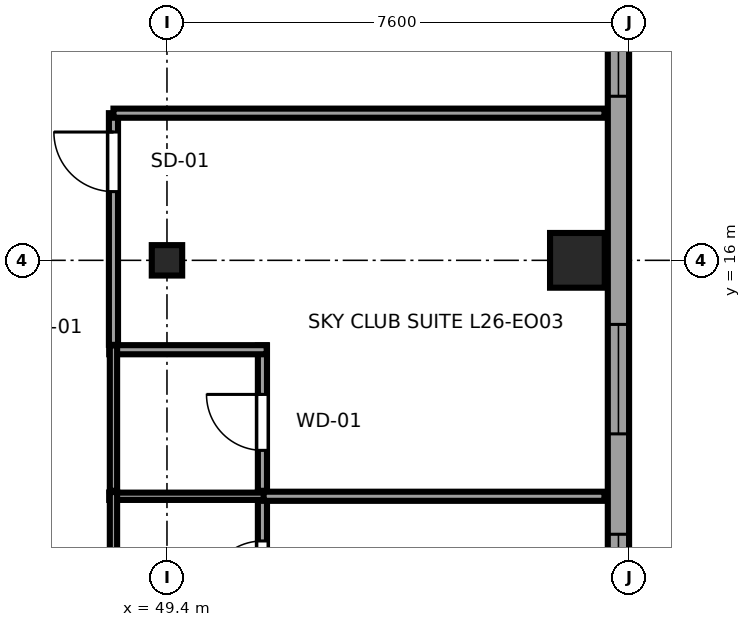
"""IFC4 building model, lengths in metres.
Left out: names, types, materials, properties, quantities, classifications, styles, units other than length and angle.
Written with IfcOpenShell. Run it as: python <this file> out.ifc"""

import sys

from ifc_helpers import new_model, si_unit, direction, frame, frame_2d, origin, origin_2d, place, context, subcontext, project, spatial, rectangle, i_section, extrude, source, transform, mapped, element, fill, save


model = new_model("IFC4")
c1 = context("Model", 3, precision=1e-05, world=origin(), true_north=direction((0.0, 1.0)))
c2 = subcontext(c1, "Body", "Model", "MODEL_VIEW")
j1 = project(units=[si_unit("LENGTHUNIT", "METRE"), si_unit("PLANEANGLEUNIT", "RADIAN")], contexts=[c1])
p1 = place(None, origin())
s1 = spatial("IfcSite", under=j1, at=p1, CompositionType="ELEMENT")
p2 = place(p1, origin())
s2 = spatial("IfcBuilding", under=s1, at=p2, CompositionType="ELEMENT")
p3 = place(p2, frame((0.0, 0.0, 104.45)))
s3 = spatial("IfcBuildingStorey", under=s2, at=p3, CompositionType="ELEMENT", Elevation=104.45)
m1 = source(origin(), c2, "Body", "SweptSolid", [
    extrude(i_section(OverallWidth=0.5, OverallDepth=0.5, WebThickness=0.022, FlangeThickness=0.034, at=origin_2d()), origin(), (0.0, 0.0, 1.0), 3.55),
])
p4 = place(p3, frame((49.4, 16.0, 0.0), z_axis=(0.0, 0.0, 1.0), x_axis=(1.0, 0.0, 0.0)))
e1 = element("IfcColumn", 1, at=p4, inside=s3, PredefinedType="COLUMN", context=c2, shape_type="MappedRepresentation", body=[
    mapped(m1, transform((0.0, 0.0, 0.0), x_axis=(1.0, 0.0, 0.0), y_axis=(0.0, 1.0, 0.0), z_axis=(0.0, 0.0, 1.0), scale=1.0)),
])
m2 = source(origin(), c2, "Body", "SweptSolid", [
    extrude(rectangle(XDim=0.9, YDim=0.9, at=origin_2d()), origin(), (0.0, 0.0, 1.0), 3.55),
])
p5 = place(p3, frame((56.15, 16.0, 0.0), z_axis=(0.0, 0.0, 1.0), x_axis=(1.0, 0.0, 0.0)))
e2 = element("IfcColumn", 2, at=p5, inside=s3, PredefinedType="COLUMN", context=c2, shape_type="MappedRepresentation", body=[
    mapped(m2, transform((0.0, 0.0, 0.0), x_axis=(1.0, 0.0, 0.0), y_axis=(0.0, 1.0, 0.0), z_axis=(0.0, 0.0, 1.0), scale=1.0)),
])
p6 = place(p3, frame((56.825, 4.617, 0.0), z_axis=(0.0, 0.0, 1.0), x_axis=(0.0, 1.0, 0.0)))
e3 = element("IfcWall", 3, at=p6, inside=s3, PredefinedType="SOLIDWALL", context=c2, shape_type="SweptSolid", body=[
    extrude(rectangle(XDim=36.766, YDim=0.35, at=frame_2d((18.383, 0.0))), origin(), (0.0, 0.0, 1.0), 3.37),
])
p7 = place(p6, frame((5.078, 0.0, 0.68)))
e4 = element("IfcOpeningElement", 4, at=p7, cuts=e3, PredefinedType="OPENING", context=c2, shape_type="SweptSolid", body=[
    extrude(rectangle(XDim=1.8, YDim=1.85, at=frame_2d((0.9, 0.925))), frame((0.0, 0.185, 0.0), z_axis=(0.0, -1.0, 0.0), x_axis=(1.0, 0.0, 0.0)), (0.0, 0.0, 1.0), 0.37),
])
p8 = place(p6, frame((8.529, 0.0, 0.68)))
e5 = element("IfcOpeningElement", 5, at=p8, cuts=e3, PredefinedType="OPENING", context=c2, shape_type="SweptSolid", body=[
    extrude(rectangle(XDim=1.8, YDim=1.85, at=frame_2d((0.9, 0.925))), frame((0.0, 0.185, 0.0), z_axis=(0.0, -1.0, 0.0), x_axis=(1.0, 0.0, 0.0)), (0.0, 0.0, 1.0), 0.37),
])
p9 = place(p6, frame((14.081, 0.0, 0.68)))
e6 = element("IfcOpeningElement", 6, at=p9, cuts=e3, PredefinedType="OPENING", context=c2, shape_type="SweptSolid", body=[
    extrude(rectangle(XDim=1.8, YDim=1.85, at=frame_2d((0.9, 0.925))), frame((0.0, 0.185, 0.0), z_axis=(0.0, -1.0, 0.0), x_axis=(1.0, 0.0, 0.0)), (0.0, 0.0, 1.0), 0.37),
])
p10 = place(p6, frame((16.933, 0.0, 0.68)))
e7 = element("IfcOpeningElement", 7, at=p10, cuts=e3, PredefinedType="OPENING", context=c2, shape_type="SweptSolid", body=[
    extrude(rectangle(XDim=1.8, YDim=1.85, at=frame_2d((0.9, 0.925))), frame((0.0, 0.185, 0.0), z_axis=(0.0, -1.0, 0.0), x_axis=(1.0, 0.0, 0.0)), (0.0, 0.0, 1.0), 0.37),
])
p11 = place(p6, frame((21.435, 0.0, 0.68)))
e8 = element("IfcOpeningElement", 8, at=p11, cuts=e3, PredefinedType="OPENING", context=c2, shape_type="SweptSolid", body=[
    extrude(rectangle(XDim=1.8, YDim=1.85, at=frame_2d((0.9, 0.925))), frame((0.0, 0.185, 0.0), z_axis=(0.0, -1.0, 0.0), x_axis=(1.0, 0.0, 0.0)), (0.0, 0.0, 1.0), 0.37),
])
p12 = place(p6, frame((25.386, 0.0, 0.68)))
e9 = element("IfcOpeningElement", 9, at=p12, cuts=e3, PredefinedType="OPENING", context=c2, shape_type="SweptSolid", body=[
    extrude(rectangle(XDim=1.8, YDim=1.85, at=frame_2d((0.9, 0.925))), frame((0.0, 0.185, 0.0), z_axis=(0.0, -1.0, 0.0), x_axis=(1.0, 0.0, 0.0)), (0.0, 0.0, 1.0), 0.37),
])
p13 = place(p6, frame((33.29, 0.0, 0.68)))
e10 = element("IfcOpeningElement", 10, at=p13, cuts=e3, PredefinedType="OPENING", context=c2, shape_type="SweptSolid", body=[
    extrude(rectangle(XDim=1.8, YDim=1.85, at=frame_2d((0.9, 0.925))), frame((0.0, 0.185, 0.0), z_axis=(0.0, -1.0, 0.0), x_axis=(1.0, 0.0, 0.0)), (0.0, 0.0, 1.0), 0.37),
])
p14 = place(p3, frame((50.97, 9.8, 0.0), z_axis=(0.0, 0.0, 1.0), x_axis=(0.0, 1.0, 0.0)))
e11 = element("IfcWall", 11, at=p14, inside=s3, PredefinedType="PARTITIONING", context=c2, shape_type="SweptSolid", body=[
    extrude(rectangle(XDim=2.39, YDim=0.15, at=frame_2d((1.195, 0.0))), origin(), (0.0, 0.0, 1.0), 3.37),
])
p15 = place(p14, frame((0.665, 0.0, 0.0)))
e12 = element("IfcOpeningElement", 12, at=p15, cuts=e11, PredefinedType="OPENING", context=c2, shape_type="SweptSolid", body=[
    extrude(rectangle(XDim=0.92, YDim=2.01, at=frame_2d((0.46, 1.005))), frame((0.0, 0.085, 0.0), z_axis=(0.0, -1.0, 0.0), x_axis=(1.0, 0.0, 0.0)), (0.0, 0.0, 1.0), 0.17),
])
p16 = place(p3, frame((48.45, 12.12, 0.0), z_axis=(0.0, 0.0, 1.0), x_axis=(1.0, 0.0, 0.0)))
e13 = element("IfcWall", 13, at=p16, inside=s3, PredefinedType="PLUMBINGWALL", context=c2, shape_type="SweptSolid", body=[
    extrude(rectangle(XDim=2.59, YDim=0.12, at=frame_2d((1.295, 0.0))), origin(), (0.0, 0.0, 1.0), 3.37),
])
p17 = place(p3, frame((48.52, 9.8, 0.0), z_axis=(0.0, 0.0, 1.0), x_axis=(0.0, 1.0, 0.0)))
e14 = element("IfcWall", 14, at=p17, inside=s3, PredefinedType="PLUMBINGWALL", context=c2, shape_type="SweptSolid", body=[
    extrude(rectangle(XDim=2.39, YDim=0.12, at=frame_2d((1.195, 0.0))), origin(), (0.0, 0.0, 1.0), 3.37),
])
p18 = place(p3, frame((50.97, 12.21, 0.0), z_axis=(0.0, 0.0, 1.0), x_axis=(0.0, 1.0, 0.0)))
e15 = element("IfcWall", 15, at=p18, inside=s3, PredefinedType="PARTITIONING", context=c2, shape_type="SweptSolid", body=[
    extrude(rectangle(XDim=2.39, YDim=0.15, at=frame_2d((1.195, 0.0))), origin(), (0.0, 0.0, 1.0), 3.37),
])
p19 = place(p18, frame((0.665, 0.0, 0.0)))
e16 = element("IfcOpeningElement", 16, at=p19, cuts=e15, PredefinedType="OPENING", context=c2, shape_type="SweptSolid", body=[
    extrude(rectangle(XDim=0.92, YDim=2.01, at=frame_2d((0.46, 1.005))), frame((0.0, 0.085, 0.0), z_axis=(0.0, -1.0, 0.0), x_axis=(1.0, 0.0, 0.0)), (0.0, 0.0, 1.0), 0.17),
])
p20 = place(p3, frame((48.45, 14.53, 0.0), z_axis=(0.0, 0.0, 1.0), x_axis=(1.0, 0.0, 0.0)))
e17 = element("IfcWall", 17, at=p20, inside=s3, PredefinedType="PARTITIONING", context=c2, shape_type="SweptSolid", body=[
    extrude(rectangle(XDim=2.59, YDim=0.15, at=frame_2d((1.295, 0.0))), origin(), (0.0, 0.0, 1.0), 3.37),
])
p21 = place(p3, frame((48.52, 12.21, 0.0), z_axis=(0.0, 0.0, 1.0), x_axis=(0.0, 1.0, 0.0)))
e18 = element("IfcWall", 18, at=p21, inside=s3, PredefinedType="PLUMBINGWALL", context=c2, shape_type="SweptSolid", body=[
    extrude(rectangle(XDim=2.39, YDim=0.12, at=frame_2d((1.195, 0.0))), origin(), (0.0, 0.0, 1.0), 3.37),
])
p22 = place(p3, frame((50.99, 12.12, 0.0), z_axis=(0.0, 0.0, 1.0), x_axis=(1.0, 0.0, 0.0)))
e19 = element("IfcWall", 19, at=p22, inside=s3, PredefinedType="PARTITIONING", context=c2, shape_type="SweptSolid", body=[
    extrude(rectangle(XDim=5.605, YDim=0.15, at=frame_2d((2.802, 0.0))), origin(), (0.0, 0.0, 1.0), 3.37),
])
p23 = place(p3, frame((48.52, 14.61, 0.0), z_axis=(0.0, 0.0, 1.0), x_axis=(0.0, 1.0, 0.0)))
e20 = element("IfcWall", 20, at=p23, inside=s3, PredefinedType="PARTITIONING", context=c2, shape_type="SweptSolid", body=[
    extrude(rectangle(XDim=3.81, YDim=0.15, at=frame_2d((1.905, 0.0))), origin(), (0.0, 0.0, 1.0), 3.37),
])
p24 = place(p23, frame((2.52, 0.0, 0.0)))
e21 = element("IfcOpeningElement", 21, at=p24, cuts=e20, PredefinedType="OPENING", context=c2, shape_type="SweptSolid", body=[
    extrude(rectangle(XDim=0.98, YDim=2.12, at=frame_2d((0.49, 1.06))), frame((0.0, 0.085, 0.0), z_axis=(0.0, -1.0, 0.0), x_axis=(1.0, 0.0, 0.0)), (0.0, 0.0, 1.0), 0.17),
])
p25 = place(p3, frame((48.52, 18.42, 0.0), z_axis=(0.0, 0.0, 1.0), x_axis=(1.0, 0.0, 0.0)))
e22 = element("IfcWall", 22, at=p25, inside=s3, PredefinedType="PARTITIONING", context=c2, shape_type="SweptSolid", body=[
    extrude(rectangle(XDim=8.075, YDim=0.15, at=frame_2d((4.038, 0.0))), origin(), (0.0, 0.0, 1.0), 3.37),
])
m3 = source(origin(), c2, "Body", "SweptSolid", [
    extrude(rectangle(XDim=1.8, YDim=1.85, at=frame_2d((0.9, 0.925))), frame((0.0, 0.09, 0.0), z_axis=(0.0, -1.0, 0.0), x_axis=(1.0, 0.0, 0.0)), (0.0, 0.0, 1.0), 0.06),
])
p26 = place(p7, origin())
e23 = element("IfcWindow", 23, at=p26, inside=s3, PartitioningType="TRIPLE_PANEL_HORIZONTAL", PredefinedType="WINDOW", context=c2, shape_type="MappedRepresentation", body=[
    mapped(m3, transform((0.0, 0.0, 0.0), x_axis=(1.0, 0.0, 0.0), y_axis=(0.0, 1.0, 0.0), z_axis=(0.0, 0.0, 1.0), scale=1.0)),
])
fill(e4, e23)
p27 = place(p8, origin())
e24 = element("IfcWindow", 24, at=p27, inside=s3, PartitioningType="TRIPLE_PANEL_HORIZONTAL", PredefinedType="WINDOW", context=c2, shape_type="MappedRepresentation", body=[
    mapped(m3, transform((0.0, 0.0, 0.0), x_axis=(1.0, 0.0, 0.0), y_axis=(0.0, 1.0, 0.0), z_axis=(0.0, 0.0, 1.0), scale=1.0)),
])
fill(e5, e24)
p28 = place(p9, origin())
e25 = element("IfcWindow", 25, at=p28, inside=s3, PartitioningType="TRIPLE_PANEL_HORIZONTAL", PredefinedType="WINDOW", context=c2, shape_type="MappedRepresentation", body=[
    mapped(m3, transform((0.0, 0.0, 0.0), x_axis=(1.0, 0.0, 0.0), y_axis=(0.0, 1.0, 0.0), z_axis=(0.0, 0.0, 1.0), scale=1.0)),
])
fill(e6, e25)
m4 = source(origin(), c2, "Body", "SweptSolid", [
    extrude(rectangle(XDim=0.92, YDim=2.01, at=frame_2d((0.46, 1.005))), frame((0.0, 0.025, 0.0), z_axis=(0.0, -1.0, 0.0), x_axis=(1.0, 0.0, 0.0)), (0.0, 0.0, 1.0), 0.05),
])
p29 = place(p15, origin())
e26 = element("IfcDoor", 26, at=p29, inside=s3, OperationType="SINGLE_SWING_LEFT", PredefinedType="DOOR", context=c2, shape_type="MappedRepresentation", body=[
    mapped(m4, transform((0.0, 0.0, 0.0), x_axis=(1.0, 0.0, 0.0), y_axis=(0.0, 1.0, 0.0), z_axis=(0.0, 0.0, 1.0), scale=1.0)),
])
fill(e12, e26)
p30 = place(p19, origin())
e27 = element("IfcDoor", 27, at=p30, inside=s3, OperationType="SINGLE_SWING_RIGHT", PredefinedType="DOOR", context=c2, shape_type="MappedRepresentation", body=[
    mapped(m4, transform((0.0, 0.0, 0.0), x_axis=(1.0, 0.0, 0.0), y_axis=(0.0, 1.0, 0.0), z_axis=(0.0, 0.0, 1.0), scale=1.0)),
])
fill(e16, e27)
m5 = source(origin(), c2, "Body", "SweptSolid", [
    extrude(rectangle(XDim=0.98, YDim=2.12, at=frame_2d((0.49, 1.06))), frame((0.0, 0.025, 0.0), z_axis=(0.0, -1.0, 0.0), x_axis=(1.0, 0.0, 0.0)), (0.0, 0.0, 1.0), 0.05),
])
p31 = place(p24, origin())
e28 = element("IfcDoor", 28, at=p31, inside=s3, OperationType="SINGLE_SWING_RIGHT", PredefinedType="DOOR", context=c2, shape_type="MappedRepresentation", body=[
    mapped(m5, transform((0.0, 0.0, 0.0), x_axis=(1.0, 0.0, 0.0), y_axis=(0.0, 1.0, 0.0), z_axis=(0.0, 0.0, 1.0), scale=1.0)),
])
fill(e21, e28)
save(model, sys.argv[1])
